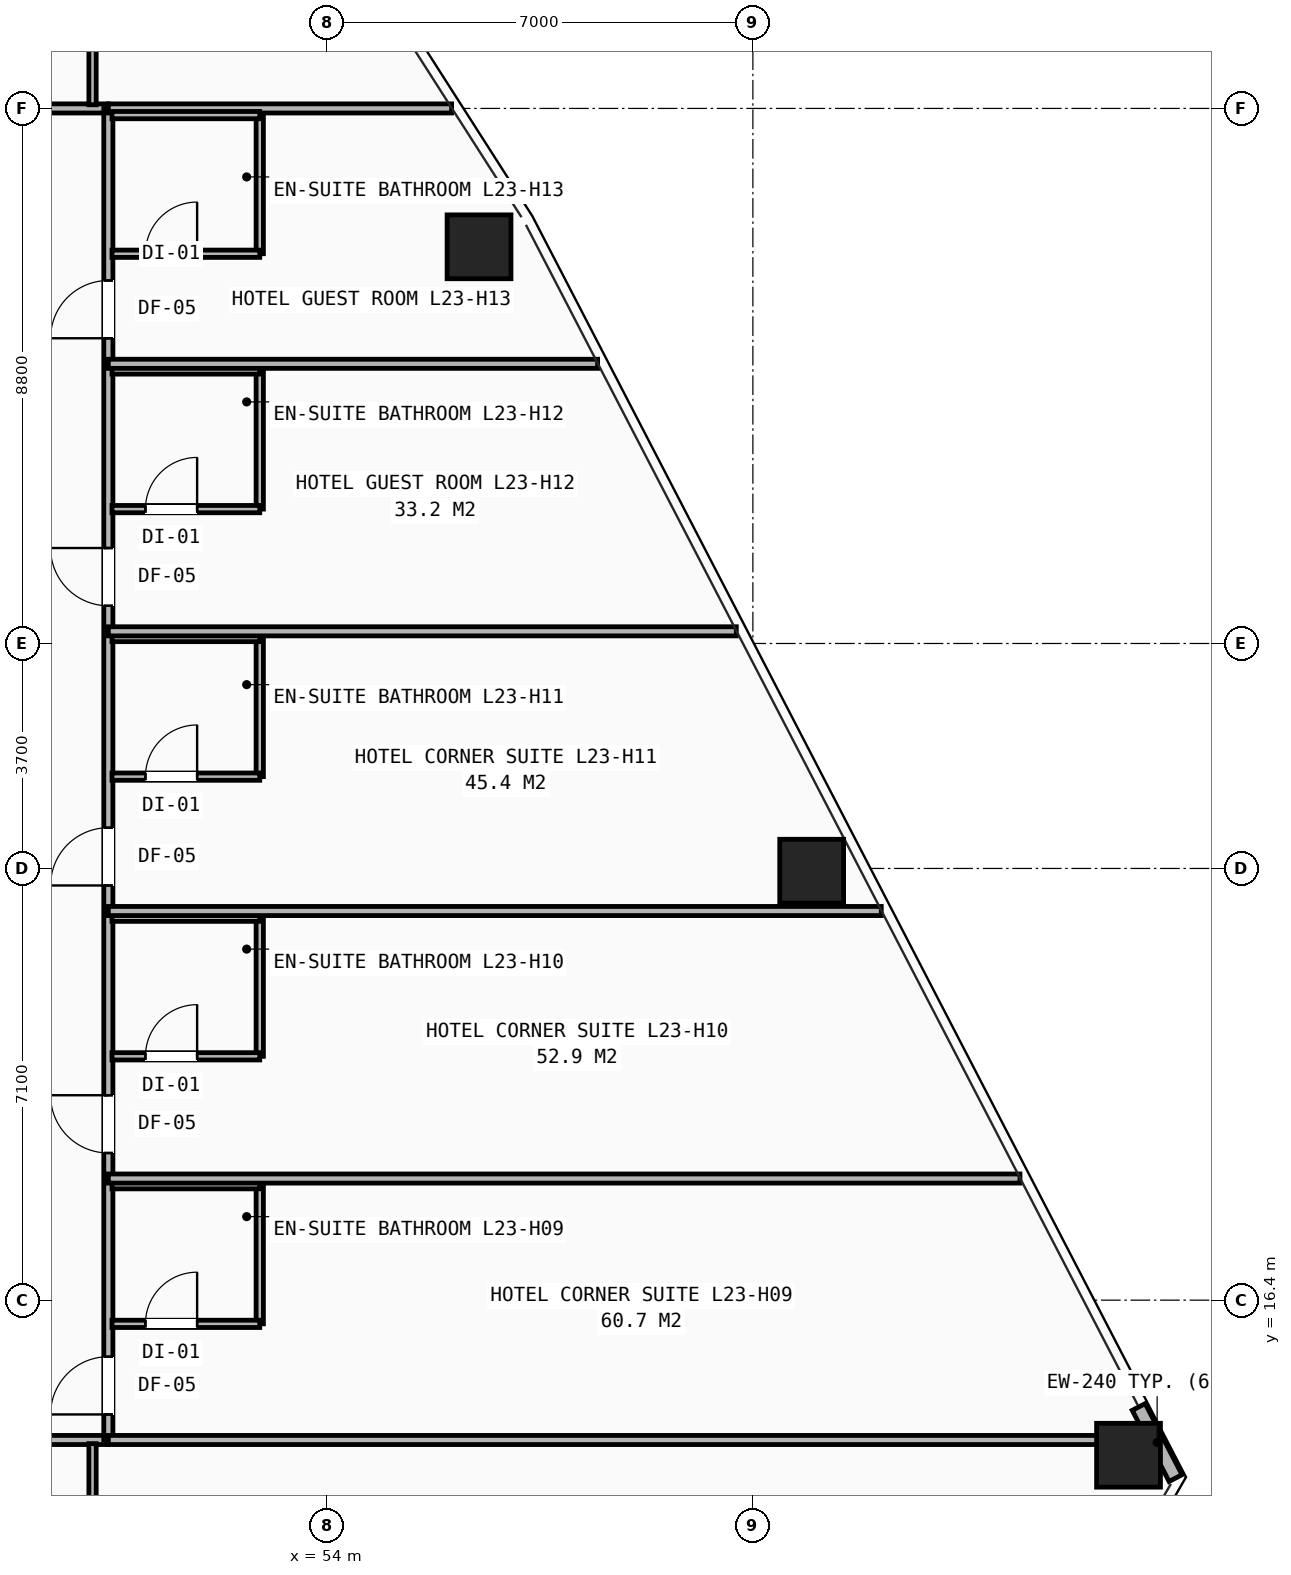
"""IFC4 building model, lengths in metres.
Left out: names, types, materials, properties, quantities, classifications, styles, units other than length and angle.
Written with IfcOpenShell. Run it as: python <this file> out.ifc"""

import sys

from ifc_helpers import new_model, si_unit, direction, frame, frame_2d, origin, origin_2d, place, context, subcontext, project, spatial, rectangle, hollow_rectangle, extrude, element, fill, save


model = new_model("IFC4")
c1 = context("Model", 3, precision=1e-05, world=origin(), true_north=direction((0.0, 1.0)))
c2 = subcontext(c1, "Body", "Model", "MODEL_VIEW")
j1 = project(units=[si_unit("LENGTHUNIT", "METRE"), si_unit("PLANEANGLEUNIT", "RADIAN")], contexts=[c1])
p1 = place(None, origin())
s1 = spatial("IfcSite", under=j1, at=p1, CompositionType="ELEMENT")
p2 = place(p1, origin())
s2 = spatial("IfcBuilding", under=s1, at=p2, CompositionType="ELEMENT")
p3 = place(p2, frame((0.0, 0.0, 83.0)))
s3 = spatial("IfcBuildingStorey", under=s2, at=p3, CompositionType="ELEMENT", Elevation=83.0)
for number, where, z_axis, x_axis in (
    (1, (67.177, 13.849, 0.0), (0.0, 0.0, 1.0), (1.0, 0.0, 0.0)),
    (2, (61.967, 23.455, 0.0), (0.0, 0.0, 1.0), (1.0, 0.0, 0.0)),
    (3, (56.496, 33.724, 0.0), (0.0, 0.0, 1.0), (1.0, 0.0, 0.0)),
):
    element("IfcColumn", number, at=place(p3, frame(where, z_axis=z_axis, x_axis=x_axis)), inside=s3, PredefinedType="COLUMN", context=c2, shape_type="SweptSolid", body=[
        extrude(hollow_rectangle(XDim=1.05, YDim=1.05, WallThickness=0.07, at=origin_2d()), origin(), (0.0, 0.0, 1.0), 3.2),
    ])
p4 = place(p3, frame((67.951, 13.473, 0.0), z_axis=(0.0, 0.0, 1.0), x_axis=(-0.460138651144, 0.887847071135, 0.0)))
e4 = element("IfcWall", 4, at=p4, inside=s3, PredefinedType="SHEAR", context=c2, shape_type="SweptSolid", body=[
    extrude(rectangle(XDim=1.317, YDim=0.24, at=frame_2d((0.659, 0.0))), origin(), (0.0, 0.0, 1.0), 2.253),
])
p5 = place(p3, frame((29.6, 14.1, 0.0), z_axis=(0.0, 0.0, 1.0), x_axis=(1.0, 0.0, 0.0)))
e5 = element("IfcWall", 5, at=p5, inside=s3, PredefinedType="PARTITIONING", context=c2, shape_type="SweptSolid", body=[
    extrude(rectangle(XDim=20.8, YDim=0.15, at=frame_2d((10.4, 0.0))), origin(), (0.0, 0.0, 1.0), 2.421),
])
p6 = place(p5, frame((0.57, 0.0, 0.0)))
e6 = element("IfcOpeningElement", 6, at=p6, cuts=e5, PredefinedType="OPENING", context=c2, shape_type="SweptSolid", body=[
    extrude(rectangle(XDim=0.95, YDim=2.1, at=frame_2d((0.475, 1.05))), frame((0.0, 0.085, 0.0), z_axis=(0.0, -1.0, 0.0), x_axis=(1.0, 0.0, 0.0)), (0.0, 0.0, 1.0), 0.17),
])
p7 = place(p5, frame((5.02, 0.0, 0.0)))
e7 = element("IfcOpeningElement", 7, at=p7, cuts=e5, PredefinedType="OPENING", context=c2, shape_type="SweptSolid", body=[
    extrude(rectangle(XDim=0.95, YDim=2.1, at=frame_2d((0.475, 1.05))), frame((0.0, 0.085, 0.0), z_axis=(0.0, -1.0, 0.0), x_axis=(1.0, 0.0, 0.0)), (0.0, 0.0, 1.0), 0.17),
])
p8 = place(p5, frame((10.62, 0.0, 0.0)))
e8 = element("IfcOpeningElement", 8, at=p8, cuts=e5, PredefinedType="OPENING", context=c2, shape_type="SweptSolid", body=[
    extrude(rectangle(XDim=0.95, YDim=2.1, at=frame_2d((0.475, 1.05))), frame((0.0, 0.085, 0.0), z_axis=(0.0, -1.0, 0.0), x_axis=(1.0, 0.0, 0.0)), (0.0, 0.0, 1.0), 0.17),
])
p9 = place(p5, frame((16.42, 0.0, 0.0)))
e9 = element("IfcOpeningElement", 9, at=p9, cuts=e5, PredefinedType="OPENING", context=c2, shape_type="SweptSolid", body=[
    extrude(rectangle(XDim=0.95, YDim=2.1, at=frame_2d((0.475, 1.05))), frame((0.0, 0.085, 0.0), z_axis=(0.0, -1.0, 0.0), x_axis=(1.0, 0.0, 0.0)), (0.0, 0.0, 1.0), 0.17),
])
p10 = place(p3, frame((40.75, 36.0, 0.0), z_axis=(0.0, 0.0, 1.0), x_axis=(1.0, 0.0, 0.0)))
e10 = element("IfcWall", 10, at=p10, inside=s3, PredefinedType="PARTITIONING", context=c2, shape_type="SweptSolid", body=[
    extrude(rectangle(XDim=9.65, YDim=0.15, at=frame_2d((4.825, 0.0))), origin(), (0.0, 0.0, 1.0), 2.503),
])
p11 = place(p10, frame((2.87, 0.0, 0.0)))
e11 = element("IfcOpeningElement", 11, at=p11, cuts=e10, PredefinedType="OPENING", context=c2, shape_type="SweptSolid", body=[
    extrude(rectangle(XDim=0.95, YDim=2.1, at=frame_2d((0.475, 1.05))), frame((0.0, 0.085, 0.0), z_axis=(0.0, -1.0, 0.0), x_axis=(1.0, 0.0, 0.0)), (0.0, 0.0, 1.0), 0.17),
])
p12 = place(p3, frame((50.4, 14.1, 0.0), z_axis=(0.0, 0.0, 1.0), x_axis=(0.0, 1.0, 0.0)))
e12 = element("IfcWall", 12, at=p12, inside=s3, PredefinedType="PARTITIONING", context=c2, shape_type="SweptSolid", body=[
    extrude(rectangle(XDim=21.9, YDim=0.15, at=frame_2d((10.95, 0.0))), origin(), (0.0, 0.0, 1.0), 2.421),
])
p13 = place(p12, frame((0.42, 0.0, 0.0)))
e13 = element("IfcOpeningElement", 13, at=p13, cuts=e12, PredefinedType="OPENING", context=c2, shape_type="SweptSolid", body=[
    extrude(rectangle(XDim=0.95, YDim=2.1, at=frame_2d((0.475, 1.05))), frame((0.0, 0.085, 0.0), z_axis=(0.0, -1.0, 0.0), x_axis=(1.0, 0.0, 0.0)), (0.0, 0.0, 1.0), 0.17),
])
p14 = place(p12, frame((4.72, 0.0, 0.0)))
e14 = element("IfcOpeningElement", 14, at=p14, cuts=e12, PredefinedType="OPENING", context=c2, shape_type="SweptSolid", body=[
    extrude(rectangle(XDim=0.95, YDim=2.1, at=frame_2d((0.475, 1.05))), frame((0.0, 0.085, 0.0), z_axis=(0.0, -1.0, 0.0), x_axis=(1.0, 0.0, 0.0)), (0.0, 0.0, 1.0), 0.17),
])
p15 = place(p12, frame((9.12, 0.0, 0.0)))
e15 = element("IfcOpeningElement", 15, at=p15, cuts=e12, PredefinedType="OPENING", context=c2, shape_type="SweptSolid", body=[
    extrude(rectangle(XDim=0.95, YDim=2.1, at=frame_2d((0.475, 1.05))), frame((0.0, 0.085, 0.0), z_axis=(0.0, -1.0, 0.0), x_axis=(1.0, 0.0, 0.0)), (0.0, 0.0, 1.0), 0.17),
])
p16 = place(p12, frame((13.72, 0.0, 0.0)))
e16 = element("IfcOpeningElement", 16, at=p16, cuts=e12, PredefinedType="OPENING", context=c2, shape_type="SweptSolid", body=[
    extrude(rectangle(XDim=0.95, YDim=2.1, at=frame_2d((0.475, 1.05))), frame((0.0, 0.085, 0.0), z_axis=(0.0, -1.0, 0.0), x_axis=(1.0, 0.0, 0.0)), (0.0, 0.0, 1.0), 0.17),
])
p17 = place(p12, frame((18.12, 0.0, 0.0)))
e17 = element("IfcOpeningElement", 17, at=p17, cuts=e12, PredefinedType="OPENING", context=c2, shape_type="SweptSolid", body=[
    extrude(rectangle(XDim=0.95, YDim=2.1, at=frame_2d((0.475, 1.05))), frame((0.0, 0.085, 0.0), z_axis=(0.0, -1.0, 0.0), x_axis=(1.0, 0.0, 0.0)), (0.0, 0.0, 1.0), 0.17),
])
p18 = place(p3, frame((50.14, 11.61, 0.0), z_axis=(0.0, 0.0, 1.0), x_axis=(0.0, 1.0, 0.0)))
e18 = element("IfcWall", 18, at=p18, inside=s3, PredefinedType="PARTITIONING", context=c2, shape_type="SweptSolid", body=[
    extrude(rectangle(XDim=2.43, YDim=0.12, at=frame_2d((1.215, 0.0))), origin(), (0.0, 0.0, 1.0), 2.97),
])
p19 = place(p3, frame((50.4, 14.1, 0.0), z_axis=(0.0, 0.0, 1.0), x_axis=(1.0, 0.0, 0.0)))
e19 = element("IfcWall", 19, at=p19, inside=s3, PredefinedType="PARTITIONING", context=c2, shape_type="SweptSolid", body=[
    extrude(rectangle(XDim=17.221, YDim=0.15, at=frame_2d((8.61, 0.0))), origin(), (0.0, 0.0, 1.0), 2.258),
])
p20 = place(p3, frame((50.4, 36.0, 0.0), z_axis=(0.0, 0.0, 1.0), x_axis=(1.0, 0.0, 0.0)))
e20 = element("IfcWall", 20, at=p20, inside=s3, PredefinedType="PARTITIONING", context=c2, shape_type="SweptSolid", body=[
    extrude(rectangle(XDim=5.645, YDim=0.15, at=frame_2d((2.823, 0.0))), origin(), (0.0, 0.0, 1.0), 2.258),
])
p21 = place(p3, frame((52.89, 16.01, 0.0), z_axis=(0.0, 0.0, 1.0), x_axis=(0.0, 1.0, 0.0)))
e21 = element("IfcWall", 21, at=p21, inside=s3, PredefinedType="PARTITIONING", context=c2, shape_type="SweptSolid", body=[
    extrude(rectangle(XDim=2.28, YDim=0.12, at=frame_2d((1.14, 0.0))), origin(), (0.0, 0.0, 1.0), 2.97),
])
p22 = place(p3, frame((50.46, 16.01, 0.0), z_axis=(0.0, 0.0, 1.0), x_axis=(1.0, 0.0, 0.0)))
e22 = element("IfcWall", 22, at=p22, inside=s3, PredefinedType="PARTITIONING", context=c2, shape_type="SweptSolid", body=[
    extrude(rectangle(XDim=2.43, YDim=0.12, at=frame_2d((1.215, 0.0))), origin(), (0.0, 0.0, 1.0), 2.97),
])
p23 = place(p22, frame((0.55, 0.0, 0.0)))
e23 = element("IfcOpeningElement", 23, at=p23, cuts=e22, PredefinedType="OPENING", context=c2, shape_type="SweptSolid", body=[
    extrude(rectangle(XDim=0.85, YDim=2.05, at=frame_2d((0.425, 1.025))), frame((0.0, 0.07, 0.0), z_axis=(0.0, -1.0, 0.0), x_axis=(1.0, 0.0, 0.0)), (0.0, 0.0, 1.0), 0.14),
])
p24 = place(p3, frame((50.46, 18.29, 0.0), z_axis=(0.0, 0.0, 1.0), x_axis=(1.0, 0.0, 0.0)))
e24 = element("IfcWall", 24, at=p24, inside=s3, PredefinedType="PARTITIONING", context=c2, shape_type="SweptSolid", body=[
    extrude(rectangle(XDim=2.43, YDim=0.12, at=frame_2d((1.215, 0.0))), origin(), (0.0, 0.0, 1.0), 2.97),
])
p25 = place(p3, frame((50.4, 18.4, 0.0), z_axis=(0.0, 0.0, 1.0), x_axis=(1.0, 0.0, 0.0)))
e25 = element("IfcWall", 25, at=p25, inside=s3, PredefinedType="PARTITIONING", context=c2, shape_type="SweptSolid", body=[
    extrude(rectangle(XDim=14.992, YDim=0.15, at=frame_2d((7.496, 0.0))), origin(), (0.0, 0.0, 1.0), 2.258),
])
p26 = place(p3, frame((52.89, 20.41, 0.0), z_axis=(0.0, 0.0, 1.0), x_axis=(0.0, 1.0, 0.0)))
e26 = element("IfcWall", 26, at=p26, inside=s3, PredefinedType="PARTITIONING", context=c2, shape_type="SweptSolid", body=[
    extrude(rectangle(XDim=2.28, YDim=0.12, at=frame_2d((1.14, 0.0))), origin(), (0.0, 0.0, 1.0), 2.97),
])
p27 = place(p3, frame((50.46, 20.41, 0.0), z_axis=(0.0, 0.0, 1.0), x_axis=(1.0, 0.0, 0.0)))
e27 = element("IfcWall", 27, at=p27, inside=s3, PredefinedType="PARTITIONING", context=c2, shape_type="SweptSolid", body=[
    extrude(rectangle(XDim=2.43, YDim=0.12, at=frame_2d((1.215, 0.0))), origin(), (0.0, 0.0, 1.0), 2.97),
])
p28 = place(p27, frame((0.55, 0.0, 0.0)))
e28 = element("IfcOpeningElement", 28, at=p28, cuts=e27, PredefinedType="OPENING", context=c2, shape_type="SweptSolid", body=[
    extrude(rectangle(XDim=0.85, YDim=2.05, at=frame_2d((0.425, 1.025))), frame((0.0, 0.07, 0.0), z_axis=(0.0, -1.0, 0.0), x_axis=(1.0, 0.0, 0.0)), (0.0, 0.0, 1.0), 0.14),
])
p29 = place(p3, frame((50.46, 22.69, 0.0), z_axis=(0.0, 0.0, 1.0), x_axis=(1.0, 0.0, 0.0)))
e29 = element("IfcWall", 29, at=p29, inside=s3, PredefinedType="PARTITIONING", context=c2, shape_type="SweptSolid", body=[
    extrude(rectangle(XDim=2.43, YDim=0.12, at=frame_2d((1.215, 0.0))), origin(), (0.0, 0.0, 1.0), 2.97),
])
p30 = place(p3, frame((50.4, 22.8, 0.0), z_axis=(0.0, 0.0, 1.0), x_axis=(1.0, 0.0, 0.0)))
e30 = element("IfcWall", 30, at=p30, inside=s3, PredefinedType="PARTITIONING", context=c2, shape_type="SweptSolid", body=[
    extrude(rectangle(XDim=12.711, YDim=0.15, at=frame_2d((6.356, 0.0))), origin(), (0.0, 0.0, 1.0), 2.258),
])
p31 = place(p3, frame((52.89, 25.01, 0.0), z_axis=(0.0, 0.0, 1.0), x_axis=(0.0, 1.0, 0.0)))
e31 = element("IfcWall", 31, at=p31, inside=s3, PredefinedType="PARTITIONING", context=c2, shape_type="SweptSolid", body=[
    extrude(rectangle(XDim=2.28, YDim=0.12, at=frame_2d((1.14, 0.0))), origin(), (0.0, 0.0, 1.0), 2.97),
])
p32 = place(p3, frame((50.46, 25.01, 0.0), z_axis=(0.0, 0.0, 1.0), x_axis=(1.0, 0.0, 0.0)))
e32 = element("IfcWall", 32, at=p32, inside=s3, PredefinedType="PARTITIONING", context=c2, shape_type="SweptSolid", body=[
    extrude(rectangle(XDim=2.43, YDim=0.12, at=frame_2d((1.215, 0.0))), origin(), (0.0, 0.0, 1.0), 2.97),
])
p33 = place(p32, frame((0.55, 0.0, 0.0)))
e33 = element("IfcOpeningElement", 33, at=p33, cuts=e32, PredefinedType="OPENING", context=c2, shape_type="SweptSolid", body=[
    extrude(rectangle(XDim=0.85, YDim=2.05, at=frame_2d((0.425, 1.025))), frame((0.0, 0.07, 0.0), z_axis=(0.0, -1.0, 0.0), x_axis=(1.0, 0.0, 0.0)), (0.0, 0.0, 1.0), 0.14),
])
p34 = place(p3, frame((50.46, 27.29, 0.0), z_axis=(0.0, 0.0, 1.0), x_axis=(1.0, 0.0, 0.0)))
e34 = element("IfcWall", 34, at=p34, inside=s3, PredefinedType="PARTITIONING", context=c2, shape_type="SweptSolid", body=[
    extrude(rectangle(XDim=2.43, YDim=0.12, at=frame_2d((1.215, 0.0))), origin(), (0.0, 0.0, 1.0), 2.97),
])
p35 = place(p3, frame((50.4, 27.4, 0.0), z_axis=(0.0, 0.0, 1.0), x_axis=(1.0, 0.0, 0.0)))
e35 = element("IfcWall", 35, at=p35, inside=s3, PredefinedType="PARTITIONING", context=c2, shape_type="SweptSolid", body=[
    extrude(rectangle(XDim=10.327, YDim=0.15, at=frame_2d((5.164, 0.0))), origin(), (0.0, 0.0, 1.0), 2.258),
])
p36 = place(p3, frame((52.89, 29.41, 0.0), z_axis=(0.0, 0.0, 1.0), x_axis=(0.0, 1.0, 0.0)))
e36 = element("IfcWall", 36, at=p36, inside=s3, PredefinedType="PARTITIONING", context=c2, shape_type="SweptSolid", body=[
    extrude(rectangle(XDim=2.28, YDim=0.12, at=frame_2d((1.14, 0.0))), origin(), (0.0, 0.0, 1.0), 2.97),
])
p37 = place(p3, frame((50.46, 29.41, 0.0), z_axis=(0.0, 0.0, 1.0), x_axis=(1.0, 0.0, 0.0)))
e37 = element("IfcWall", 37, at=p37, inside=s3, PredefinedType="PARTITIONING", context=c2, shape_type="SweptSolid", body=[
    extrude(rectangle(XDim=2.43, YDim=0.12, at=frame_2d((1.215, 0.0))), origin(), (0.0, 0.0, 1.0), 2.97),
])
p38 = place(p37, frame((0.55, 0.0, 0.0)))
e38 = element("IfcOpeningElement", 38, at=p38, cuts=e37, PredefinedType="OPENING", context=c2, shape_type="SweptSolid", body=[
    extrude(rectangle(XDim=0.85, YDim=2.05, at=frame_2d((0.425, 1.025))), frame((0.0, 0.07, 0.0), z_axis=(0.0, -1.0, 0.0), x_axis=(1.0, 0.0, 0.0)), (0.0, 0.0, 1.0), 0.14),
])
p39 = place(p3, frame((50.46, 31.69, 0.0), z_axis=(0.0, 0.0, 1.0), x_axis=(1.0, 0.0, 0.0)))
e39 = element("IfcWall", 39, at=p39, inside=s3, PredefinedType="PARTITIONING", context=c2, shape_type="SweptSolid", body=[
    extrude(rectangle(XDim=2.43, YDim=0.12, at=frame_2d((1.215, 0.0))), origin(), (0.0, 0.0, 1.0), 2.421),
])
p40 = place(p3, frame((50.4, 31.8, 0.0), z_axis=(0.0, 0.0, 1.0), x_axis=(1.0, 0.0, 0.0)))
e40 = element("IfcWall", 40, at=p40, inside=s3, PredefinedType="PARTITIONING", context=c2, shape_type="SweptSolid", body=[
    extrude(rectangle(XDim=8.046, YDim=0.15, at=frame_2d((4.023, 0.0))), origin(), (0.0, 0.0, 1.0), 2.258),
])
p41 = place(p3, frame((52.89, 33.61, 0.0), z_axis=(0.0, 0.0, 1.0), x_axis=(0.0, 1.0, 0.0)))
e41 = element("IfcWall", 41, at=p41, inside=s3, PredefinedType="PARTITIONING", context=c2, shape_type="SweptSolid", body=[
    extrude(rectangle(XDim=2.28, YDim=0.12, at=frame_2d((1.14, 0.0))), origin(), (0.0, 0.0, 1.0), 2.97),
])
p42 = place(p3, frame((50.46, 33.61, 0.0), z_axis=(0.0, 0.0, 1.0), x_axis=(1.0, 0.0, 0.0)))
e42 = element("IfcWall", 42, at=p42, inside=s3, PredefinedType="PARTITIONING", context=c2, shape_type="SweptSolid", body=[
    extrude(rectangle(XDim=2.43, YDim=0.12, at=frame_2d((1.215, 0.0))), origin(), (0.0, 0.0, 1.0), 2.503),
])
p43 = place(p42, frame((0.55, 0.0, 0.0)))
e43 = element("IfcOpeningElement", 43, at=p43, cuts=e42, PredefinedType="OPENING", context=c2, shape_type="SweptSolid", body=[
    extrude(rectangle(XDim=0.85, YDim=2.05, at=frame_2d((0.425, 1.025))), frame((0.0, 0.07, 0.0), z_axis=(0.0, -1.0, 0.0), x_axis=(1.0, 0.0, 0.0)), (0.0, 0.0, 1.0), 0.14),
])
for number, where, z_axis, x_axis in (
    (44, (50.46, 35.89, 0.0), (0.0, 0.0, 1.0), (1.0, 0.0, 0.0)),
    (45, (50.14, 36.06, 0.0), (0.0, 0.0, 1.0), (0.0, 1.0, 0.0)),
):
    element("IfcWall", number, at=place(p3, frame(where, z_axis=z_axis, x_axis=x_axis)), inside=s3, PredefinedType="PARTITIONING", context=c2, shape_type="SweptSolid", body=[
        extrude(rectangle(XDim=2.43, YDim=0.12, at=frame_2d((1.215, 0.0))), origin(), (0.0, 0.0, 1.0), 2.97),
    ])
p44 = place(p13, origin())
e46 = element("IfcDoor", 46, at=p44, inside=s3, OperationType="SINGLE_SWING_LEFT", PredefinedType="DOOR", context=c2, shape_type="SweptSolid", body=[
    extrude(rectangle(XDim=0.95, YDim=2.1, at=frame_2d((0.475, 1.05))), frame((0.0, 0.025, 0.0), z_axis=(0.0, -1.0, 0.0), x_axis=(1.0, 0.0, 0.0)), (0.0, 0.0, 1.0), 0.05),
])
fill(e13, e46)
p45 = place(p23, origin())
e47 = element("IfcDoor", 47, at=p45, inside=s3, OperationType="SINGLE_SWING_RIGHT", PredefinedType="DOOR", context=c2, shape_type="SweptSolid", body=[
    extrude(rectangle(XDim=0.85, YDim=2.05, at=frame_2d((0.425, 1.025))), frame((0.0, 0.025, 0.0), z_axis=(0.0, -1.0, 0.0), x_axis=(1.0, 0.0, 0.0)), (0.0, 0.0, 1.0), 0.05),
])
fill(e23, e47)
p46 = place(p14, origin())
e48 = element("IfcDoor", 48, at=p46, inside=s3, OperationType="SINGLE_SWING_RIGHT", PredefinedType="DOOR", context=c2, shape_type="SweptSolid", body=[
    extrude(rectangle(XDim=0.95, YDim=2.1, at=frame_2d((0.475, 1.05))), frame((0.0, 0.025, 0.0), z_axis=(0.0, -1.0, 0.0), x_axis=(1.0, 0.0, 0.0)), (0.0, 0.0, 1.0), 0.05),
])
fill(e14, e48)
p47 = place(p28, origin())
e49 = element("IfcDoor", 49, at=p47, inside=s3, OperationType="SINGLE_SWING_RIGHT", PredefinedType="DOOR", context=c2, shape_type="SweptSolid", body=[
    extrude(rectangle(XDim=0.85, YDim=2.05, at=frame_2d((0.425, 1.025))), frame((0.0, 0.025, 0.0), z_axis=(0.0, -1.0, 0.0), x_axis=(1.0, 0.0, 0.0)), (0.0, 0.0, 1.0), 0.05),
])
fill(e28, e49)
p48 = place(p15, origin())
e50 = element("IfcDoor", 50, at=p48, inside=s3, OperationType="SINGLE_SWING_LEFT", PredefinedType="DOOR", context=c2, shape_type="SweptSolid", body=[
    extrude(rectangle(XDim=0.95, YDim=2.1, at=frame_2d((0.475, 1.05))), frame((0.0, 0.025, 0.0), z_axis=(0.0, -1.0, 0.0), x_axis=(1.0, 0.0, 0.0)), (0.0, 0.0, 1.0), 0.05),
])
fill(e15, e50)
p49 = place(p33, origin())
e51 = element("IfcDoor", 51, at=p49, inside=s3, OperationType="SINGLE_SWING_RIGHT", PredefinedType="DOOR", context=c2, shape_type="SweptSolid", body=[
    extrude(rectangle(XDim=0.85, YDim=2.05, at=frame_2d((0.425, 1.025))), frame((0.0, 0.025, 0.0), z_axis=(0.0, -1.0, 0.0), x_axis=(1.0, 0.0, 0.0)), (0.0, 0.0, 1.0), 0.05),
])
fill(e33, e51)
p50 = place(p16, origin())
e52 = element("IfcDoor", 52, at=p50, inside=s3, OperationType="SINGLE_SWING_RIGHT", PredefinedType="DOOR", context=c2, shape_type="SweptSolid", body=[
    extrude(rectangle(XDim=0.95, YDim=2.1, at=frame_2d((0.475, 1.05))), frame((0.0, 0.025, 0.0), z_axis=(0.0, -1.0, 0.0), x_axis=(1.0, 0.0, 0.0)), (0.0, 0.0, 1.0), 0.05),
])
fill(e16, e52)
p51 = place(p38, origin())
e53 = element("IfcDoor", 53, at=p51, inside=s3, OperationType="SINGLE_SWING_RIGHT", PredefinedType="DOOR", context=c2, shape_type="SweptSolid", body=[
    extrude(rectangle(XDim=0.85, YDim=2.05, at=frame_2d((0.425, 1.025))), frame((0.0, 0.025, 0.0), z_axis=(0.0, -1.0, 0.0), x_axis=(1.0, 0.0, 0.0)), (0.0, 0.0, 1.0), 0.05),
])
fill(e38, e53)
p52 = place(p17, origin())
e54 = element("IfcDoor", 54, at=p52, inside=s3, OperationType="SINGLE_SWING_LEFT", PredefinedType="DOOR", context=c2, shape_type="SweptSolid", body=[
    extrude(rectangle(XDim=0.95, YDim=2.1, at=frame_2d((0.475, 1.05))), frame((0.0, 0.025, 0.0), z_axis=(0.0, -1.0, 0.0), x_axis=(1.0, 0.0, 0.0)), (0.0, 0.0, 1.0), 0.05),
])
fill(e17, e54)
p53 = place(p43, origin())
e55 = element("IfcDoor", 55, at=p53, inside=s3, OperationType="SINGLE_SWING_RIGHT", PredefinedType="DOOR", context=c2, shape_type="SweptSolid", body=[
    extrude(rectangle(XDim=0.85, YDim=2.05, at=frame_2d((0.425, 1.025))), frame((0.0, 0.025, 0.0), z_axis=(0.0, -1.0, 0.0), x_axis=(1.0, 0.0, 0.0)), (0.0, 0.0, 1.0), 0.05),
])
fill(e43, e55)
save(model, sys.argv[1])
